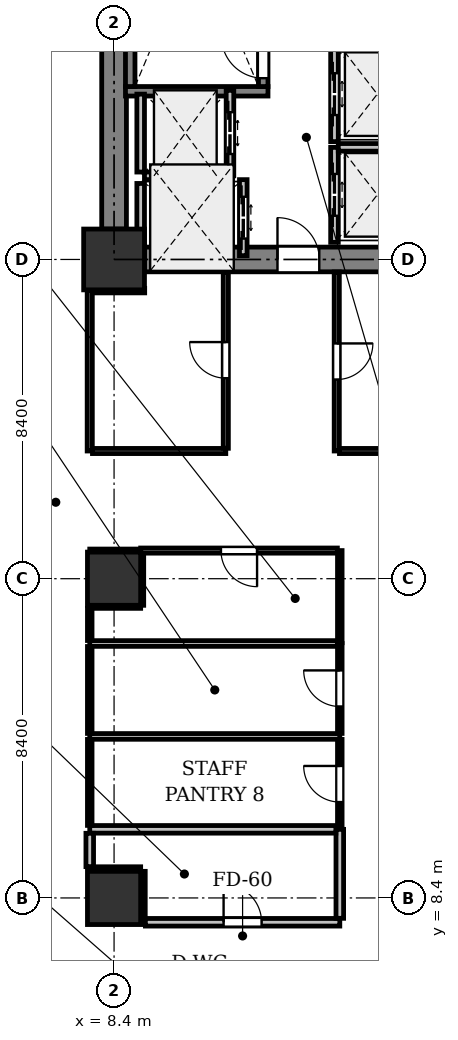
"""IFC4 building model, lengths in metres.
Left out: names, types, materials, properties, quantities, classifications, styles, units other than length and angle.
Written with IfcOpenShell. Run it as: python <this file> out.ifc"""

import sys

from ifc_helpers import new_model, si_unit, direction, frame, frame_2d, origin, origin_2d, place, context, subcontext, project, spatial, rectangle, extrude, element, fill, save


model = new_model("IFC4")
c1 = context("Model", 3, precision=1e-05, world=origin(), true_north=direction((0.0, 1.0)))
c2 = subcontext(c1, "Body", "Model", "MODEL_VIEW")
j1 = project(units=[si_unit("LENGTHUNIT", "METRE"), si_unit("PLANEANGLEUNIT", "RADIAN")], contexts=[c1])
p1 = place(None, origin())
s1 = spatial("IfcSite", under=j1, at=p1, CompositionType="ELEMENT")
p2 = place(p1, origin())
s2 = spatial("IfcBuilding", under=s1, at=p2, CompositionType="ELEMENT")
p3 = place(p2, frame((0.0, 0.0, 10.2)))
s3 = spatial("IfcBuildingStorey", under=s2, at=p3, CompositionType="ELEMENT", Elevation=10.2)
for number, where, z_axis, x_axis in (
    (1, (8.4, 8.4, 0.0), (0.0, 0.0, 1.0), (1.0, 0.0, 0.0)),
    (2, (8.4, 16.8, 0.0), (0.0, 0.0, 1.0), (1.0, 0.0, 0.0)),
):
    element("IfcColumn", number, at=place(p3, frame(where, z_axis=z_axis, x_axis=x_axis)), inside=s3, PredefinedType="COLUMN", context=c2, shape_type="SweptSolid", body=[
        extrude(rectangle(XDim=1.4, YDim=1.4, at=origin_2d()), origin(), (0.0, 0.0, 1.0), 4.8),
    ])
p4 = place(p3, frame((8.4, 25.2, 0.0), z_axis=(0.0, 0.0, 1.0), x_axis=(1.0, 0.0, 0.0)))
e3 = element("IfcColumn", 3, at=p4, inside=s3, PredefinedType="COLUMN", context=c2, shape_type="SweptSolid", body=[
    extrude(rectangle(XDim=1.6, YDim=1.6, at=origin_2d()), origin(), (0.0, 0.0, 1.0), 4.8),
])
p5 = place(p3, frame((8.4, 26.0, 0.0), z_axis=(0.0, 0.0, 1.0), x_axis=(0.0, 1.0, 0.0)))
e4 = element("IfcWall", 4, at=p5, inside=s3, PredefinedType="SHEAR", context=c2, shape_type="SweptSolid", body=[
    extrude(rectangle(XDim=6.8, YDim=0.65, at=frame_2d((3.4, 0.0))), origin(), (0.0, 0.0, 1.0), 4.525),
])
p6 = place(p3, frame((9.2, 25.2, 0.0), z_axis=(0.0, 0.0, 1.0), x_axis=(1.0, 0.0, 0.0)))
e5 = element("IfcWall", 5, at=p6, inside=s3, PredefinedType="SHEAR", context=c2, shape_type="SweptSolid", body=[
    extrude(rectangle(XDim=6.8, YDim=0.65, at=frame_2d((3.4, 0.0))), origin(), (0.0, 0.0, 1.0), 4.525),
])
p7 = place(p6, frame((3.5, 0.0, 0.0)))
e6 = element("IfcOpeningElement", 6, at=p7, cuts=e5, PredefinedType="OPENING", context=c2, shape_type="SweptSolid", body=[
    extrude(rectangle(XDim=1.1, YDim=2.15, at=frame_2d((0.55, 1.075))), frame((0.0, 0.335, 0.0), z_axis=(0.0, -1.0, 0.0), x_axis=(1.0, 0.0, 0.0)), (0.0, 0.0, 1.0), 0.67),
])
p8 = place(p3, frame((12.45, 29.625, 0.0), z_axis=(0.0, 0.0, 1.0), x_axis=(-1.0, 0.0, 0.0)))
e7 = element("IfcWall", 7, at=p8, inside=s3, PredefinedType="SHEAR", context=c2, shape_type="SweptSolid", body=[
    extrude(rectangle(XDim=3.75, YDim=0.25, at=frame_2d((1.875, 0.0))), origin(), (0.0, 0.0, 1.0), 4.525),
])
p9 = place(p3, frame((12.325, 29.75, 0.0), z_axis=(0.0, 0.0, 1.0), x_axis=(0.0, 1.0, 0.0)))
e8 = element("IfcWall", 8, at=p9, inside=s3, PredefinedType="SHEAR", context=c2, shape_type="SweptSolid", body=[
    extrude(rectangle(XDim=7.75, YDim=0.25, at=frame_2d((3.875, 0.0))), origin(), (0.0, 0.0, 1.0), 4.525),
])
p10 = place(p9, frame((0.22, 0.0, 0.0)))
e9 = element("IfcOpeningElement", 9, at=p10, cuts=e8, PredefinedType="OPENING", context=c2, shape_type="SweptSolid", body=[
    extrude(rectangle(XDim=1.1, YDim=2.15, at=frame_2d((0.55, 1.075))), frame((0.0, 0.135, 0.0), z_axis=(0.0, -1.0, 0.0), x_axis=(1.0, 0.0, 0.0)), (0.0, 0.0, 1.0), 0.27),
])
p11 = place(p3, frame((8.825, 29.75, 0.0), z_axis=(0.0, 0.0, 1.0), x_axis=(0.0, 1.0, 0.0)))
e10 = element("IfcWall", 10, at=p11, inside=s3, PredefinedType="SHEAR", context=c2, shape_type="SweptSolid", body=[
    extrude(rectangle(XDim=7.75, YDim=0.25, at=frame_2d((3.875, 0.0))), origin(), (0.0, 0.0, 1.0), 4.525),
])
p12 = place(p3, frame((11.45, 27.4, 0.0), z_axis=(0.0, 0.0, 1.0), x_axis=(0.0, 1.0, 0.0)))
e11 = element("IfcWall", 11, at=p12, inside=s3, PredefinedType="PARTITIONING", context=c2, shape_type="SweptSolid", body=[
    extrude(rectangle(XDim=2.25, YDim=0.2, at=frame_2d((1.125, 0.0))), origin(), (0.0, 0.0, 1.0), 4.525),
])
p13 = place(p12, frame((0.575, 0.0, 0.0)))
e12 = element("IfcOpeningElement", 12, at=p13, cuts=e11, PredefinedType="OPENING", context=c2, shape_type="SweptSolid", body=[
    extrude(rectangle(XDim=1.1, YDim=2.2, at=frame_2d((0.55, 1.1))), frame((0.0, 0.11, 0.0), z_axis=(0.0, -1.0, 0.0), x_axis=(1.0, 0.0, 0.0)), (0.0, 0.0, 1.0), 0.22),
])
p14 = place(p3, frame((9.1, 27.5, 0.0), z_axis=(0.0, 0.0, 1.0), x_axis=(0.0, 1.0, 0.0)))
e13 = element("IfcWall", 13, at=p14, inside=s3, PredefinedType="PARTITIONING", context=c2, shape_type="SweptSolid", body=[
    extrude(rectangle(XDim=2.05, YDim=0.2, at=frame_2d((1.025, 0.0))), origin(), (0.0, 0.0, 1.0), 4.525),
])
p15 = place(p3, frame((9.2, 27.4, 0.0), z_axis=(0.0, 0.0, 1.0), x_axis=(1.0, 0.0, 0.0)))
e14 = element("IfcWall", 14, at=p15, inside=s3, PredefinedType="PARTITIONING", context=c2, shape_type="SweptSolid", body=[
    extrude(rectangle(XDim=2.15, YDim=0.2, at=frame_2d((1.075, 0.0))), origin(), (0.0, 0.0, 1.0), 4.525),
])
p16 = place(p3, frame((11.8, 25.3, 0.0), z_axis=(0.0, 0.0, 1.0), x_axis=(0.0, 1.0, 0.0)))
e15 = element("IfcWall", 15, at=p16, inside=s3, PredefinedType="PARTITIONING", context=c2, shape_type="SweptSolid", body=[
    extrude(rectangle(XDim=2.0, YDim=0.2, at=frame_2d((1.0, 0.0))), origin(), (0.0, 0.0, 1.0), 4.525),
])
p17 = place(p16, frame((0.45, 0.0, 0.0)))
e16 = element("IfcOpeningElement", 16, at=p17, cuts=e15, PredefinedType="OPENING", context=c2, shape_type="SweptSolid", body=[
    extrude(rectangle(XDim=1.1, YDim=2.2, at=frame_2d((0.55, 1.1))), frame((0.0, 0.11, 0.0), z_axis=(0.0, -1.0, 0.0), x_axis=(1.0, 0.0, 0.0)), (0.0, 0.0, 1.0), 0.22),
])
p18 = place(p3, frame((9.1, 25.4, 0.0), z_axis=(0.0, 0.0, 1.0), x_axis=(0.0, 1.0, 0.0)))
e17 = element("IfcWall", 17, at=p18, inside=s3, PredefinedType="PARTITIONING", context=c2, shape_type="SweptSolid", body=[
    extrude(rectangle(XDim=1.8, YDim=0.2, at=frame_2d((0.9, 0.0))), origin(), (0.0, 0.0, 1.0), 4.525),
])
p19 = place(p3, frame((14.2, 25.65, 0.0), z_axis=(0.0, 0.0, 1.0), x_axis=(0.0, 1.0, 0.0)))
e18 = element("IfcWall", 18, at=p19, inside=s3, PredefinedType="PARTITIONING", context=c2, shape_type="SweptSolid", body=[
    extrude(rectangle(XDim=2.5, YDim=0.2, at=frame_2d((1.25, 0.0))), origin(), (0.0, 0.0, 1.0), 4.525),
])
p20 = place(p19, frame((0.7, 0.0, 0.0)))
e19 = element("IfcOpeningElement", 19, at=p20, cuts=e18, PredefinedType="OPENING", context=c2, shape_type="SweptSolid", body=[
    extrude(rectangle(XDim=1.1, YDim=2.2, at=frame_2d((0.55, 1.1))), frame((0.0, 0.11, 0.0), z_axis=(0.0, -1.0, 0.0), x_axis=(1.0, 0.0, 0.0)), (0.0, 0.0, 1.0), 0.22),
])
p21 = place(p3, frame((14.3, 28.15, 0.0), z_axis=(0.0, 0.0, 1.0), x_axis=(1.0, 0.0, 0.0)))
e20 = element("IfcWall", 20, at=p21, inside=s3, PredefinedType="PARTITIONING", context=c2, shape_type="SweptSolid", body=[
    extrude(rectangle(XDim=2.05, YDim=0.2, at=frame_2d((1.025, 0.0))), origin(), (0.0, 0.0, 1.0), 4.525),
])
p22 = place(p3, frame((14.2, 28.3, 0.0), z_axis=(0.0, 0.0, 1.0), x_axis=(0.0, 1.0, 0.0)))
e21 = element("IfcWall", 21, at=p22, inside=s3, PredefinedType="PARTITIONING", context=c2, shape_type="SweptSolid", body=[
    extrude(rectangle(XDim=2.5, YDim=0.2, at=frame_2d((1.25, 0.0))), origin(), (0.0, 0.0, 1.0), 4.525),
])
p23 = place(p22, frame((0.7, 0.0, 0.0)))
e22 = element("IfcOpeningElement", 22, at=p23, cuts=e21, PredefinedType="OPENING", context=c2, shape_type="SweptSolid", body=[
    extrude(rectangle(XDim=1.1, YDim=2.2, at=frame_2d((0.55, 1.1))), frame((0.0, 0.11, 0.0), z_axis=(0.0, -1.0, 0.0), x_axis=(1.0, 0.0, 0.0)), (0.0, 0.0, 1.0), 0.22),
])
p24 = place(p3, frame((7.76, 9.12, 0.0), z_axis=(0.0, 0.0, 1.0), x_axis=(1.0, 0.0, 0.0)))
e23 = element("IfcWall", 23, at=p24, inside=s3, PredefinedType="PARTITIONING", context=c2, shape_type="SweptSolid", body=[
    extrude(rectangle(XDim=1.34, YDim=0.2, at=frame_2d((0.67, 0.0))), origin(), (0.0, 0.0, 1.0), 3.913),
])
p25 = place(p3, frame((9.12, 9.1, 0.0), z_axis=(0.0, 0.0, 1.0), x_axis=(0.0, -1.0, 0.0)))
e24 = element("IfcWall", 24, at=p25, inside=s3, PredefinedType="PARTITIONING", context=c2, shape_type="SweptSolid", body=[
    extrude(rectangle(XDim=1.34, YDim=0.2, at=frame_2d((0.67, 0.0))), origin(), (0.0, 0.0, 1.0), 3.725),
])
p26 = place(p3, frame((9.224, 7.76, 0.0), z_axis=(0.0, 0.0, 1.0), x_axis=(1.0, 0.0, 0.0)))
e25 = element("IfcWall", 25, at=p26, inside=s3, PredefinedType="PARTITIONING", context=c2, shape_type="SweptSolid", body=[
    extrude(rectangle(XDim=5.116, YDim=0.2, at=frame_2d((2.558, 0.0))), origin(), (0.0, 0.0, 1.0), 4.122),
])
p27 = place(p26, frame((2.058, 0.0, 0.0)))
e26 = element("IfcOpeningElement", 26, at=p27, cuts=e25, PredefinedType="OPENING", context=c2, shape_type="SweptSolid", body=[
    extrude(rectangle(XDim=1.0, YDim=2.15, at=frame_2d((0.5, 1.075))), frame((0.0, 0.11, 0.0), z_axis=(0.0, -1.0, 0.0), x_axis=(1.0, 0.0, 0.0)), (0.0, 0.0, 1.0), 0.22),
])
p28 = place(p3, frame((14.34, 7.864, 0.0), z_axis=(0.0, 0.0, 1.0), x_axis=(0.0, 1.0, 0.0)))
e27 = element("IfcWall", 27, at=p28, inside=s3, PredefinedType="PARTITIONING", context=c2, shape_type="SweptSolid", body=[
    extrude(rectangle(XDim=2.341, YDim=0.2, at=frame_2d((1.17, 0.0))), origin(), (0.0, 0.0, 1.0), 3.725),
])
p29 = place(p3, frame((14.236, 10.205, 0.0), z_axis=(0.0, 0.0, 1.0), x_axis=(-1.0, 0.0, 0.0)))
e28 = element("IfcWall", 28, at=p29, inside=s3, PredefinedType="PARTITIONING", context=c2, shape_type="SweptSolid", body=[
    extrude(rectangle(XDim=6.476, YDim=0.2, at=frame_2d((3.238, 0.0))), origin(), (0.0, 0.0, 1.0), 3.913),
])
p30 = place(p3, frame((7.76, 10.101, 0.0), z_axis=(0.0, 0.0, 1.0), x_axis=(0.0, -1.0, 0.0)))
e29 = element("IfcWall", 29, at=p30, inside=s3, PredefinedType="PARTITIONING", context=c2, shape_type="SweptSolid", body=[
    extrude(rectangle(XDim=0.877, YDim=0.2, at=frame_2d((0.438, 0.0))), origin(), (0.0, 0.0, 1.0), 4.525),
])
p31 = place(p3, frame((7.76, 12.65, 0.0), z_axis=(0.0, 0.0, 1.0), x_axis=(1.0, 0.0, 0.0)))
e30 = element("IfcWall", 30, at=p31, inside=s3, PredefinedType="PARTITIONING", context=c2, shape_type="SweptSolid", body=[
    extrude(rectangle(XDim=6.58, YDim=0.15, at=frame_2d((3.29, 0.0))), origin(), (0.0, 0.0, 1.0), 3.913),
])
p32 = place(p3, frame((14.34, 12.729, 0.0), z_axis=(0.0, 0.0, 1.0), x_axis=(0.0, 1.0, 0.0)))
e31 = element("IfcWall", 31, at=p32, inside=s3, PredefinedType="PARTITIONING", context=c2, shape_type="SweptSolid", body=[
    extrude(rectangle(XDim=2.366, YDim=0.12, at=frame_2d((1.183, 0.0))), origin(), (0.0, 0.0, 1.0), 4.525),
])
p33 = place(p32, frame((0.708, 0.0, 0.0)))
e32 = element("IfcOpeningElement", 32, at=p33, cuts=e31, PredefinedType="OPENING", context=c2, shape_type="SweptSolid", body=[
    extrude(rectangle(XDim=0.95, YDim=2.15, at=frame_2d((0.475, 1.075))), frame((0.0, 0.07, 0.0), z_axis=(0.0, -1.0, 0.0), x_axis=(1.0, 0.0, 0.0)), (0.0, 0.0, 1.0), 0.14),
])
p34 = place(p3, frame((14.276, 15.095, 0.0), z_axis=(0.0, 0.0, 1.0), x_axis=(-1.0, 0.0, 0.0)))
e33 = element("IfcWall", 33, at=p34, inside=s3, PredefinedType="PARTITIONING", context=c2, shape_type="SweptSolid", body=[
    extrude(rectangle(XDim=6.516, YDim=0.15, at=frame_2d((3.258, 0.0))), origin(), (0.0, 0.0, 1.0), 3.913),
])
p35 = place(p3, frame((7.76, 15.016, 0.0), z_axis=(0.0, 0.0, 1.0), x_axis=(0.0, -1.0, 0.0)))
e34 = element("IfcWall", 34, at=p35, inside=s3, PredefinedType="PARTITIONING", context=c2, shape_type="SweptSolid", body=[
    extrude(rectangle(XDim=2.287, YDim=0.12, at=frame_2d((1.144, 0.0))), origin(), (0.0, 0.0, 1.0), 4.525),
])
p36 = place(p3, frame((7.76, 17.52, 0.0), z_axis=(0.0, 0.0, 1.0), x_axis=(1.0, 0.0, 0.0)))
e35 = element("IfcWall", 35, at=p36, inside=s3, PredefinedType="PARTITIONING", context=c2, shape_type="SweptSolid", body=[
    extrude(rectangle(XDim=1.34, YDim=0.12, at=frame_2d((0.67, 0.0))), origin(), (0.0, 0.0, 1.0), 3.913),
])
p37 = place(p3, frame((9.12, 17.5, 0.0), z_axis=(0.0, 0.0, 1.0), x_axis=(0.0, -1.0, 0.0)))
e36 = element("IfcWall", 36, at=p37, inside=s3, PredefinedType="PARTITIONING", context=c2, shape_type="SweptSolid", body=[
    extrude(rectangle(XDim=1.4, YDim=0.12, at=frame_2d((0.7, 0.0))), origin(), (0.0, 0.0, 1.0), 3.725),
])
p38 = place(p3, frame((9.1, 16.08, 0.0), z_axis=(0.0, 0.0, 1.0), x_axis=(-1.0, 0.0, 0.0)))
e37 = element("IfcWall", 37, at=p38, inside=s3, PredefinedType="PARTITIONING", context=c2, shape_type="SweptSolid", body=[
    extrude(rectangle(XDim=1.34, YDim=0.12, at=frame_2d((0.67, 0.0))), origin(), (0.0, 0.0, 1.0), 3.913),
])
p39 = place(p3, frame((7.76, 16.016, 0.0), z_axis=(0.0, 0.0, 1.0), x_axis=(0.0, -1.0, 0.0)))
e38 = element("IfcWall", 38, at=p39, inside=s3, PredefinedType="PARTITIONING", context=c2, shape_type="SweptSolid", body=[
    extrude(rectangle(XDim=0.842, YDim=0.12, at=frame_2d((0.421, 0.0))), origin(), (0.0, 0.0, 1.0), 4.525),
])
p40 = place(p3, frame((14.34, 15.115, 0.0), z_axis=(0.0, 0.0, 1.0), x_axis=(0.0, 1.0, 0.0)))
e39 = element("IfcWall", 39, at=p40, inside=s3, PredefinedType="PARTITIONING", context=c2, shape_type="SweptSolid", body=[
    extrude(rectangle(XDim=2.425, YDim=0.12, at=frame_2d((1.212, 0.0))), origin(), (0.0, 0.0, 1.0), 3.725),
])
p41 = place(p3, frame((14.276, 17.54, 0.0), z_axis=(0.0, 0.0, 1.0), x_axis=(-1.0, 0.0, 0.0)))
e40 = element("IfcWall", 40, at=p41, inside=s3, PredefinedType="PARTITIONING", context=c2, shape_type="SweptSolid", body=[
    extrude(rectangle(XDim=5.176, YDim=0.135, at=frame_2d((2.588, 0.0))), origin(), (0.0, 0.0, 1.0), 4.525),
])
p42 = place(p41, frame((2.113, 0.0, 0.0)))
e41 = element("IfcOpeningElement", 41, at=p42, cuts=e40, PredefinedType="OPENING", context=c2, shape_type="SweptSolid", body=[
    extrude(rectangle(XDim=0.95, YDim=2.15, at=frame_2d((0.475, 1.075))), frame((0.0, 0.077, 0.0), z_axis=(0.0, -1.0, 0.0), x_axis=(1.0, 0.0, 0.0)), (0.0, 0.0, 1.0), 0.155),
])
p43 = place(p3, frame((7.76, 12.571, 0.0), z_axis=(0.0, 0.0, 1.0), x_axis=(0.0, -1.0, 0.0)))
e42 = element("IfcWall", 42, at=p43, inside=s3, PredefinedType="PARTITIONING", context=c2, shape_type="SweptSolid", body=[
    extrude(rectangle(XDim=2.262, YDim=0.12, at=frame_2d((1.131, 0.0))), origin(), (0.0, 0.0, 1.0), 4.525),
])
p44 = place(p3, frame((14.34, 10.225, 0.0), z_axis=(0.0, 0.0, 1.0), x_axis=(0.0, 1.0, 0.0)))
e43 = element("IfcWall", 43, at=p44, inside=s3, PredefinedType="PARTITIONING", context=c2, shape_type="SweptSolid", body=[
    extrude(rectangle(XDim=2.346, YDim=0.12, at=frame_2d((1.173, 0.0))), origin(), (0.0, 0.0, 1.0), 4.525),
])
p45 = place(p44, frame((0.698, 0.0, 0.0)))
e44 = element("IfcOpeningElement", 44, at=p45, cuts=e43, PredefinedType="OPENING", context=c2, shape_type="SweptSolid", body=[
    extrude(rectangle(XDim=0.95, YDim=2.15, at=frame_2d((0.475, 1.075))), frame((0.0, 0.07, 0.0), z_axis=(0.0, -1.0, 0.0), x_axis=(1.0, 0.0, 0.0)), (0.0, 0.0, 1.0), 0.14),
])
p46 = place(p3, frame((14.26, 24.871, 0.0), z_axis=(0.0, 0.0, 1.0), x_axis=(0.0, -1.0, 0.0)))
e45 = element("IfcWall", 45, at=p46, inside=s3, PredefinedType="PARTITIONING", context=c2, shape_type="SweptSolid", body=[
    extrude(rectangle(XDim=4.711, YDim=0.135, at=frame_2d((2.355, 0.0))), origin(), (0.0, 0.0, 1.0), 4.525),
])
p47 = place(p46, frame((1.881, 0.0, 0.0)))
e46 = element("IfcOpeningElement", 46, at=p47, cuts=e45, PredefinedType="OPENING", context=c2, shape_type="SweptSolid", body=[
    extrude(rectangle(XDim=0.95, YDim=2.15, at=frame_2d((0.475, 1.075))), frame((0.0, 0.077, 0.0), z_axis=(0.0, -1.0, 0.0), x_axis=(1.0, 0.0, 0.0)), (0.0, 0.0, 1.0), 0.155),
])
p48 = place(p3, frame((14.332, 20.16, 0.0), z_axis=(0.0, 0.0, 1.0), x_axis=(1.0, 0.0, 0.0)))
e47 = element("IfcWall", 47, at=p48, inside=s3, PredefinedType="PARTITIONING", context=c2, shape_type="SweptSolid", body=[
    extrude(rectangle(XDim=3.208, YDim=0.135, at=frame_2d((1.604, 0.0))), origin(), (0.0, 0.0, 1.0), 3.913),
])
p49 = place(p3, frame((9.206, 24.381, 0.0), z_axis=(0.0, 0.0, 1.0), x_axis=(-0.999999771885, -0.00067544733, 0.0)))
e48 = element("IfcWall", 48, at=p49, inside=s3, PredefinedType="PARTITIONING", context=c2, shape_type="SweptSolid", body=[
    extrude(rectangle(XDim=1.446, YDim=0.12, at=frame_2d((0.723, 0.0))), origin(), (0.0, 0.0, 1.0), 3.913),
])
p50 = place(p3, frame((7.76, 24.38, 0.0), z_axis=(0.0, 0.0, 1.0), x_axis=(0.0, -1.0, 0.0)))
e49 = element("IfcWall", 49, at=p50, inside=s3, PredefinedType="PARTITIONING", context=c2, shape_type="SweptSolid", body=[
    extrude(rectangle(XDim=4.22, YDim=0.135, at=frame_2d((2.11, 0.0))), origin(), (0.0, 0.0, 1.0), 4.525),
])
p51 = place(p3, frame((7.832, 20.16, 0.0), z_axis=(0.0, 0.0, 1.0), x_axis=(1.0, 0.0, 0.0)))
e50 = element("IfcWall", 50, at=p51, inside=s3, PredefinedType="PARTITIONING", context=c2, shape_type="SweptSolid", body=[
    extrude(rectangle(XDim=3.509, YDim=0.135, at=frame_2d((1.754, 0.0))), origin(), (0.0, 0.0, 1.0), 3.913),
])
p52 = place(p3, frame((11.34, 20.231, 0.0), z_axis=(0.0, 0.0, 1.0), x_axis=(0.0, 1.0, 0.0)))
e51 = element("IfcWall", 51, at=p52, inside=s3, PredefinedType="PARTITIONING", context=c2, shape_type="SweptSolid", body=[
    extrude(rectangle(XDim=4.64, YDim=0.135, at=frame_2d((2.32, 0.0))), origin(), (0.0, 0.0, 1.0), 4.525),
])
p53 = place(p52, frame((1.845, 0.0, 0.0)))
e52 = element("IfcOpeningElement", 52, at=p53, cuts=e51, PredefinedType="OPENING", context=c2, shape_type="SweptSolid", body=[
    extrude(rectangle(XDim=0.95, YDim=2.15, at=frame_2d((0.475, 1.075))), frame((0.0, 0.077, 0.0), z_axis=(0.0, -1.0, 0.0), x_axis=(1.0, 0.0, 0.0)), (0.0, 0.0, 1.0), 0.155),
])
p54 = place(p7, origin())
e53 = element("IfcDoor", 53, at=p54, inside=s3, OperationType="SINGLE_SWING_LEFT", PredefinedType="DOOR", context=c2, shape_type="SweptSolid", body=[
    extrude(rectangle(XDim=1.1, YDim=2.15, at=frame_2d((0.55, 1.075))), frame((0.0, 0.025, 0.0), z_axis=(0.0, -1.0, 0.0), x_axis=(1.0, 0.0, 0.0)), (0.0, 0.0, 1.0), 0.05),
])
fill(e6, e53)
p55 = place(p10, origin())
e54 = element("IfcDoor", 54, at=p55, inside=s3, OperationType="SINGLE_SWING_RIGHT", PredefinedType="DOOR", context=c2, shape_type="SweptSolid", body=[
    extrude(rectangle(XDim=1.1, YDim=2.15, at=frame_2d((0.55, 1.075))), frame((0.0, 0.025, 0.0), z_axis=(0.0, -1.0, 0.0), x_axis=(1.0, 0.0, 0.0)), (0.0, 0.0, 1.0), 0.05),
])
fill(e9, e54)
p56 = place(p13, origin())
e55 = element("IfcDoor", 55, at=p56, inside=s3, OperationType="DOUBLE_DOOR_SLIDING", PredefinedType="DOOR", context=c2, shape_type="SweptSolid", body=[
    extrude(rectangle(XDim=1.1, YDim=2.2, at=frame_2d((0.55, 1.1))), frame((0.0, 0.025, 0.0), z_axis=(0.0, -1.0, 0.0), x_axis=(1.0, 0.0, 0.0)), (0.0, 0.0, 1.0), 0.05),
])
fill(e12, e55)
p57 = place(p17, origin())
e56 = element("IfcDoor", 56, at=p57, inside=s3, OperationType="DOUBLE_DOOR_SLIDING", PredefinedType="DOOR", context=c2, shape_type="SweptSolid", body=[
    extrude(rectangle(XDim=1.1, YDim=2.2, at=frame_2d((0.55, 1.1))), frame((0.0, 0.025, 0.0), z_axis=(0.0, -1.0, 0.0), x_axis=(1.0, 0.0, 0.0)), (0.0, 0.0, 1.0), 0.05),
])
fill(e16, e56)
p58 = place(p20, origin())
e57 = element("IfcDoor", 57, at=p58, inside=s3, OperationType="DOUBLE_DOOR_SLIDING", PredefinedType="DOOR", context=c2, shape_type="SweptSolid", body=[
    extrude(rectangle(XDim=1.1, YDim=2.2, at=frame_2d((0.55, 1.1))), frame((0.0, 0.025, 0.0), z_axis=(0.0, -1.0, 0.0), x_axis=(1.0, 0.0, 0.0)), (0.0, 0.0, 1.0), 0.05),
])
fill(e19, e57)
p59 = place(p23, origin())
e58 = element("IfcDoor", 58, at=p59, inside=s3, OperationType="DOUBLE_DOOR_SLIDING", PredefinedType="DOOR", context=c2, shape_type="SweptSolid", body=[
    extrude(rectangle(XDim=1.1, YDim=2.2, at=frame_2d((0.55, 1.1))), frame((0.0, 0.025, 0.0), z_axis=(0.0, -1.0, 0.0), x_axis=(1.0, 0.0, 0.0)), (0.0, 0.0, 1.0), 0.05),
])
fill(e22, e58)
p60 = place(p27, origin())
e59 = element("IfcDoor", 59, at=p60, inside=s3, OperationType="SINGLE_SWING_LEFT", PredefinedType="DOOR", context=c2, shape_type="SweptSolid", body=[
    extrude(rectangle(XDim=1.0, YDim=2.15, at=frame_2d((0.5, 1.075))), frame((0.0, 0.025, 0.0), z_axis=(0.0, -1.0, 0.0), x_axis=(1.0, 0.0, 0.0)), (0.0, 0.0, 1.0), 0.05),
])
fill(e26, e59)
p61 = place(p33, origin())
e60 = element("IfcDoor", 60, at=p61, inside=s3, OperationType="SINGLE_SWING_RIGHT", PredefinedType="DOOR", context=c2, shape_type="SweptSolid", body=[
    extrude(rectangle(XDim=0.95, YDim=2.15, at=frame_2d((0.475, 1.075))), frame((0.0, 0.025, 0.0), z_axis=(0.0, -1.0, 0.0), x_axis=(1.0, 0.0, 0.0)), (0.0, 0.0, 1.0), 0.05),
])
fill(e32, e60)
p62 = place(p42, origin())
e61 = element("IfcDoor", 61, at=p62, inside=s3, OperationType="SINGLE_SWING_LEFT", PredefinedType="DOOR", context=c2, shape_type="SweptSolid", body=[
    extrude(rectangle(XDim=0.95, YDim=2.15, at=frame_2d((0.475, 1.075))), frame((0.0, 0.025, 0.0), z_axis=(0.0, -1.0, 0.0), x_axis=(1.0, 0.0, 0.0)), (0.0, 0.0, 1.0), 0.05),
])
fill(e41, e61)
p63 = place(p45, origin())
e62 = element("IfcDoor", 62, at=p63, inside=s3, OperationType="SINGLE_SWING_RIGHT", PredefinedType="DOOR", context=c2, shape_type="SweptSolid", body=[
    extrude(rectangle(XDim=0.95, YDim=2.15, at=frame_2d((0.475, 1.075))), frame((0.0, 0.025, 0.0), z_axis=(0.0, -1.0, 0.0), x_axis=(1.0, 0.0, 0.0)), (0.0, 0.0, 1.0), 0.05),
])
fill(e44, e62)
p64 = place(p47, origin())
e63 = element("IfcDoor", 63, at=p64, inside=s3, OperationType="SINGLE_SWING_LEFT", PredefinedType="DOOR", context=c2, shape_type="SweptSolid", body=[
    extrude(rectangle(XDim=0.95, YDim=2.15, at=frame_2d((0.475, 1.075))), frame((0.0, 0.025, 0.0), z_axis=(0.0, -1.0, 0.0), x_axis=(1.0, 0.0, 0.0)), (0.0, 0.0, 1.0), 0.05),
])
fill(e46, e63)
p65 = place(p53, origin())
e64 = element("IfcDoor", 64, at=p65, inside=s3, OperationType="SINGLE_SWING_RIGHT", PredefinedType="DOOR", context=c2, shape_type="SweptSolid", body=[
    extrude(rectangle(XDim=0.95, YDim=2.15, at=frame_2d((0.475, 1.075))), frame((0.0, 0.025, 0.0), z_axis=(0.0, -1.0, 0.0), x_axis=(1.0, 0.0, 0.0)), (0.0, 0.0, 1.0), 0.05),
])
fill(e52, e64)
save(model, sys.argv[1])
